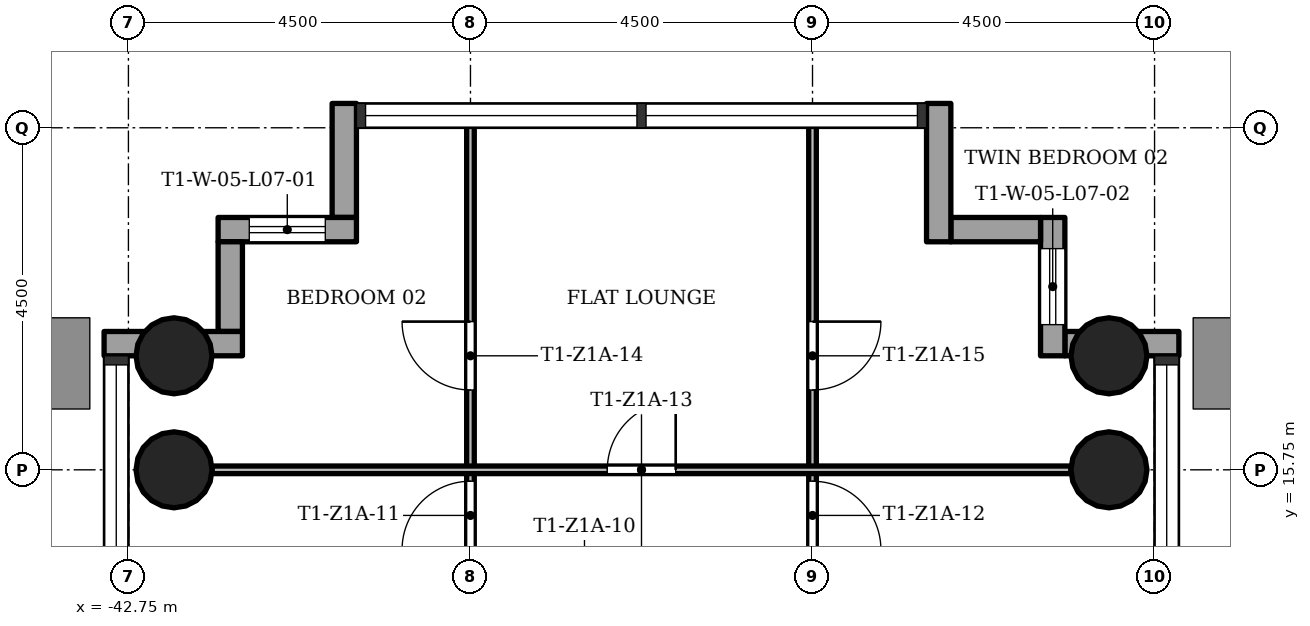
"""IFC4 building model, lengths in metres.
Left out: names, types, materials, properties, quantities, classifications, styles, units other than length and angle.
Written with IfcOpenShell. Run it as: python <this file> out.ifc"""

import sys

from ifc_helpers import new_model, si_unit, direction, frame, frame_2d, origin, origin_2d, place, context, subcontext, project, spatial, rectangle, hollow_circle, extrude, element, fill, save


model = new_model("IFC4")
c1 = context("Model", 3, precision=1e-05, world=origin(), true_north=direction((0.0, 1.0)))
c2 = subcontext(c1, "Body", "Model", "MODEL_VIEW")
j1 = project(units=[si_unit("LENGTHUNIT", "METRE"), si_unit("PLANEANGLEUNIT", "RADIAN")], contexts=[c1])
p1 = place(None, origin())
s1 = spatial("IfcSite", under=j1, at=p1, CompositionType="ELEMENT")
p2 = place(p1, origin())
s2 = spatial("IfcBuilding", under=s1, at=p2, CompositionType="ELEMENT")
p3 = place(p2, frame((0.0, 0.0, 31.3)))
s3 = spatial("IfcBuildingStorey", under=s2, at=p3, CompositionType="ELEMENT", Elevation=31.3)
for number, where, z_axis, x_axis in (
    (1, (-29.85, 15.75, 0.0), (0.0, 0.0, 1.0), (1.0, 0.0, 0.0)),
    (2, (-42.15, 15.75, 0.0), (0.0, 0.0, 1.0), (1.0, 0.0, 0.0)),
    (3, (-29.85, 17.25, 0.0), (0.0, 0.0, 1.0), (1.0, 0.0, 0.0)),
    (4, (-42.15, 17.25, 0.0), (0.0, 0.0, 1.0), (1.0, 0.0, 0.0)),
):
    element("IfcColumn", number, at=place(p3, frame(where, z_axis=z_axis, x_axis=x_axis)), inside=s3, PredefinedType="COLUMN", context=c2, shape_type="SweptSolid", body=[
        extrude(hollow_circle(Radius=0.5, WallThickness=0.036, at=origin_2d()), origin(), (0.0, 0.0, 1.0), 3.4),
    ])
p4 = place(p3, frame((-28.93, 17.41, -0.3), z_axis=(0.0, 0.0, 1.0), x_axis=(-1.0, 0.0, 0.0)))
e5 = element("IfcWall", 5, at=p4, inside=s3, PredefinedType="STANDARD", context=c2, shape_type="SweptSolid", body=[
    extrude(rectangle(XDim=1.5, YDim=0.32, at=frame_2d((0.75, 0.0))), origin(), (0.0, 0.0, 1.0), 3.4),
])
p5 = place(p3, frame((-30.59, 17.25, -0.3), z_axis=(0.0, 0.0, 1.0), x_axis=(0.0, 1.0, 0.0)))
e6 = element("IfcWall", 6, at=p5, inside=s3, PredefinedType="STANDARD", context=c2, shape_type="SweptSolid", body=[
    extrude(rectangle(XDim=1.82, YDim=0.32, at=frame_2d((0.91, 0.0))), origin(), (0.0, 0.0, 1.0), 3.4),
])
p6 = place(p5, frame((0.41, 0.0, 1.2)))
e7 = element("IfcOpeningElement", 7, at=p6, cuts=e6, PredefinedType="OPENING", context=c2, shape_type="SweptSolid", body=[
    extrude(rectangle(XDim=1.0, YDim=1.5, at=frame_2d((0.5, 0.75))), frame((0.0, 0.17, 0.0), z_axis=(0.0, -1.0, 0.0), x_axis=(1.0, 0.0, 0.0)), (0.0, 0.0, 1.0), 0.34),
])
p7 = place(p3, frame((-30.75, 18.91, -0.3), z_axis=(0.0, 0.0, 1.0), x_axis=(-1.0, 0.0, 0.0)))
e8 = element("IfcWall", 8, at=p7, inside=s3, PredefinedType="STANDARD", context=c2, shape_type="SweptSolid", body=[
    extrude(rectangle(XDim=1.18, YDim=0.32, at=frame_2d((0.59, 0.0))), origin(), (0.0, 0.0, 1.0), 3.4),
])
p8 = place(p3, frame((-32.09, 18.75, -0.3), z_axis=(0.0, 0.0, 1.0), x_axis=(0.0, 1.0, 0.0)))
e9 = element("IfcWall", 9, at=p8, inside=s3, PredefinedType="STANDARD", context=c2, shape_type="SweptSolid", body=[
    extrude(rectangle(XDim=1.82, YDim=0.32, at=frame_2d((0.91, 0.0))), origin(), (0.0, 0.0, 1.0), 3.4),
])
p9 = place(p3, frame((-39.91, 20.57, -0.3), z_axis=(0.0, 0.0, 1.0), x_axis=(0.0, -1.0, 0.0)))
e10 = element("IfcWall", 10, at=p9, inside=s3, PredefinedType="STANDARD", context=c2, shape_type="SweptSolid", body=[
    extrude(rectangle(XDim=1.5, YDim=0.32, at=frame_2d((0.75, 0.0))), origin(), (0.0, 0.0, 1.0), 3.4),
])
p10 = place(p3, frame((-39.75, 18.91, -0.3), z_axis=(0.0, 0.0, 1.0), x_axis=(-1.0, 0.0, 0.0)))
e11 = element("IfcWall", 11, at=p10, inside=s3, PredefinedType="STANDARD", context=c2, shape_type="SweptSolid", body=[
    extrude(rectangle(XDim=1.82, YDim=0.32, at=frame_2d((0.91, 0.0))), origin(), (0.0, 0.0, 1.0), 3.4),
])
p11 = place(p10, frame((0.41, 0.0, 1.2)))
e12 = element("IfcOpeningElement", 12, at=p11, cuts=e11, PredefinedType="OPENING", context=c2, shape_type="SweptSolid", body=[
    extrude(rectangle(XDim=1.0, YDim=1.5, at=frame_2d((0.5, 0.75))), frame((0.0, 0.17, 0.0), z_axis=(0.0, -1.0, 0.0), x_axis=(1.0, 0.0, 0.0)), (0.0, 0.0, 1.0), 0.34),
])
p12 = place(p3, frame((-41.41, 18.75, -0.3), z_axis=(0.0, 0.0, 1.0), x_axis=(0.0, -1.0, 0.0)))
e13 = element("IfcWall", 13, at=p12, inside=s3, PredefinedType="STANDARD", context=c2, shape_type="SweptSolid", body=[
    extrude(rectangle(XDim=1.18, YDim=0.32, at=frame_2d((0.59, 0.0))), origin(), (0.0, 0.0, 1.0), 3.4),
])
p13 = place(p3, frame((-41.25, 17.41, -0.3), z_axis=(0.0, 0.0, 1.0), x_axis=(-1.0, 0.0, 0.0)))
e14 = element("IfcWall", 14, at=p13, inside=s3, PredefinedType="STANDARD", context=c2, shape_type="SweptSolid", body=[
    extrude(rectangle(XDim=1.82, YDim=0.32, at=frame_2d((0.91, 0.0))), origin(), (0.0, 0.0, 1.0), 3.4),
])
p14 = place(p3, frame((-38.25, 11.25, 0.0), z_axis=(0.0, 0.0, 1.0), x_axis=(0.0, 1.0, 0.0)))
e15 = element("IfcWall", 15, at=p14, inside=s3, PredefinedType="PARTITIONING", context=c2, shape_type="SweptSolid", body=[
    extrude(rectangle(XDim=9.1, YDim=0.1, at=frame_2d((4.55, 0.0))), origin(), (0.0, 0.0, 1.0), 3.0),
])
p15 = place(p14, frame((3.45, 0.0, 0.0)))
e16 = element("IfcOpeningElement", 16, at=p15, cuts=e15, PredefinedType="OPENING", context=c2, shape_type="SweptSolid", body=[
    extrude(rectangle(XDim=0.9, YDim=2.1, at=frame_2d((0.45, 1.05))), frame((0.0, 0.06, 0.0), z_axis=(0.0, -1.0, 0.0), x_axis=(1.0, 0.0, 0.0)), (0.0, 0.0, 1.0), 0.12),
])
p16 = place(p14, frame((5.55, 0.0, 0.0)))
e17 = element("IfcOpeningElement", 17, at=p16, cuts=e15, PredefinedType="OPENING", context=c2, shape_type="SweptSolid", body=[
    extrude(rectangle(XDim=0.9, YDim=2.1, at=frame_2d((0.45, 1.05))), frame((0.0, 0.06, 0.0), z_axis=(0.0, -1.0, 0.0), x_axis=(1.0, 0.0, 0.0)), (0.0, 0.0, 1.0), 0.12),
])
p17 = place(p3, frame((-33.75, 11.25, 0.0), z_axis=(0.0, 0.0, 1.0), x_axis=(0.0, 1.0, 0.0)))
e18 = element("IfcWall", 18, at=p17, inside=s3, PredefinedType="PARTITIONING", context=c2, shape_type="SweptSolid", body=[
    extrude(rectangle(XDim=9.1, YDim=0.1, at=frame_2d((4.55, 0.0))), origin(), (0.0, 0.0, 1.0), 3.0),
])
p18 = place(p17, frame((3.45, 0.0, 0.0)))
e19 = element("IfcOpeningElement", 19, at=p18, cuts=e18, PredefinedType="OPENING", context=c2, shape_type="SweptSolid", body=[
    extrude(rectangle(XDim=0.9, YDim=2.1, at=frame_2d((0.45, 1.05))), frame((0.0, 0.06, 0.0), z_axis=(0.0, -1.0, 0.0), x_axis=(1.0, 0.0, 0.0)), (0.0, 0.0, 1.0), 0.12),
])
p19 = place(p17, frame((5.55, 0.0, 0.0)))
e20 = element("IfcOpeningElement", 20, at=p19, cuts=e18, PredefinedType="OPENING", context=c2, shape_type="SweptSolid", body=[
    extrude(rectangle(XDim=0.9, YDim=2.1, at=frame_2d((0.45, 1.05))), frame((0.0, 0.06, 0.0), z_axis=(0.0, -1.0, 0.0), x_axis=(1.0, 0.0, 0.0)), (0.0, 0.0, 1.0), 0.12),
])
p20 = place(p3, frame((-41.65, 15.75, 0.0), z_axis=(0.0, 0.0, 1.0), x_axis=(1.0, 0.0, 0.0)))
e21 = element("IfcWall", 21, at=p20, inside=s3, PredefinedType="PARTITIONING", context=c2, shape_type="SweptSolid", body=[
    extrude(rectangle(XDim=11.3, YDim=0.1, at=frame_2d((5.65, 0.0))), origin(), (0.0, 0.0, 1.0), 3.0),
])
p21 = place(p20, frame((5.2, 0.0, 0.0)))
e22 = element("IfcOpeningElement", 22, at=p21, cuts=e21, PredefinedType="OPENING", context=c2, shape_type="SweptSolid", body=[
    extrude(rectangle(XDim=0.9, YDim=2.1, at=frame_2d((0.45, 1.05))), frame((0.0, 0.06, 0.0), z_axis=(0.0, -1.0, 0.0), x_axis=(1.0, 0.0, 0.0)), (0.0, 0.0, 1.0), 0.12),
])
p22 = place(p15, origin())
e23 = element("IfcDoor", 23, at=p22, inside=s3, OperationType="SINGLE_SWING_RIGHT", PredefinedType="DOOR", context=c2, shape_type="SweptSolid", body=[
    extrude(rectangle(XDim=0.9, YDim=2.1, at=frame_2d((0.45, 1.05))), frame((0.0, 0.025, 0.0), z_axis=(0.0, -1.0, 0.0), x_axis=(1.0, 0.0, 0.0)), (0.0, 0.0, 1.0), 0.05),
])
fill(e16, e23)
p23 = place(p18, origin())
e24 = element("IfcDoor", 24, at=p23, inside=s3, OperationType="SINGLE_SWING_LEFT", PredefinedType="DOOR", context=c2, shape_type="SweptSolid", body=[
    extrude(rectangle(XDim=0.9, YDim=2.1, at=frame_2d((0.45, 1.05))), frame((0.0, 0.025, 0.0), z_axis=(0.0, -1.0, 0.0), x_axis=(1.0, 0.0, 0.0)), (0.0, 0.0, 1.0), 0.05),
])
fill(e19, e24)
p24 = place(p21, origin())
e25 = element("IfcDoor", 25, at=p24, inside=s3, OperationType="SINGLE_SWING_LEFT", PredefinedType="DOOR", context=c2, shape_type="SweptSolid", body=[
    extrude(rectangle(XDim=0.9, YDim=2.1, at=frame_2d((0.45, 1.05))), frame((0.0, 0.025, 0.0), z_axis=(0.0, -1.0, 0.0), x_axis=(1.0, 0.0, 0.0)), (0.0, 0.0, 1.0), 0.05),
])
fill(e22, e25)
p25 = place(p16, origin())
e26 = element("IfcDoor", 26, at=p25, inside=s3, OperationType="SINGLE_SWING_LEFT", PredefinedType="DOOR", context=c2, shape_type="SweptSolid", body=[
    extrude(rectangle(XDim=0.9, YDim=2.1, at=frame_2d((0.45, 1.05))), frame((0.0, 0.025, 0.0), z_axis=(0.0, -1.0, 0.0), x_axis=(1.0, 0.0, 0.0)), (0.0, 0.0, 1.0), 0.05),
])
fill(e17, e26)
p26 = place(p19, origin())
e27 = element("IfcDoor", 27, at=p26, inside=s3, OperationType="SINGLE_SWING_RIGHT", PredefinedType="DOOR", context=c2, shape_type="SweptSolid", body=[
    extrude(rectangle(XDim=0.9, YDim=2.1, at=frame_2d((0.45, 1.05))), frame((0.0, 0.025, 0.0), z_axis=(0.0, -1.0, 0.0), x_axis=(1.0, 0.0, 0.0)), (0.0, 0.0, 1.0), 0.05),
])
fill(e20, e27)
p27 = place(p11, origin())
e28 = element("IfcWindow", 28, at=p27, inside=s3, PartitioningType="SINGLE_PANEL", PredefinedType="WINDOW", context=c2, shape_type="SweptSolid", body=[
    extrude(rectangle(XDim=1.0, YDim=1.5, at=frame_2d((0.5, 0.75))), frame((0.0, 0.03, 0.0), z_axis=(0.0, -1.0, 0.0), x_axis=(1.0, 0.0, 0.0)), (0.0, 0.0, 1.0), 0.06),
])
fill(e12, e28)
p28 = place(p6, origin())
e29 = element("IfcWindow", 29, at=p28, inside=s3, PartitioningType="SINGLE_PANEL", PredefinedType="WINDOW", context=c2, shape_type="SweptSolid", body=[
    extrude(rectangle(XDim=1.0, YDim=1.5, at=frame_2d((0.5, 0.75))), frame((0.0, 0.03, 0.0), z_axis=(0.0, -1.0, 0.0), x_axis=(1.0, 0.0, 0.0)), (0.0, 0.0, 1.0), 0.06),
])
fill(e7, e29)
save(model, sys.argv[1])
